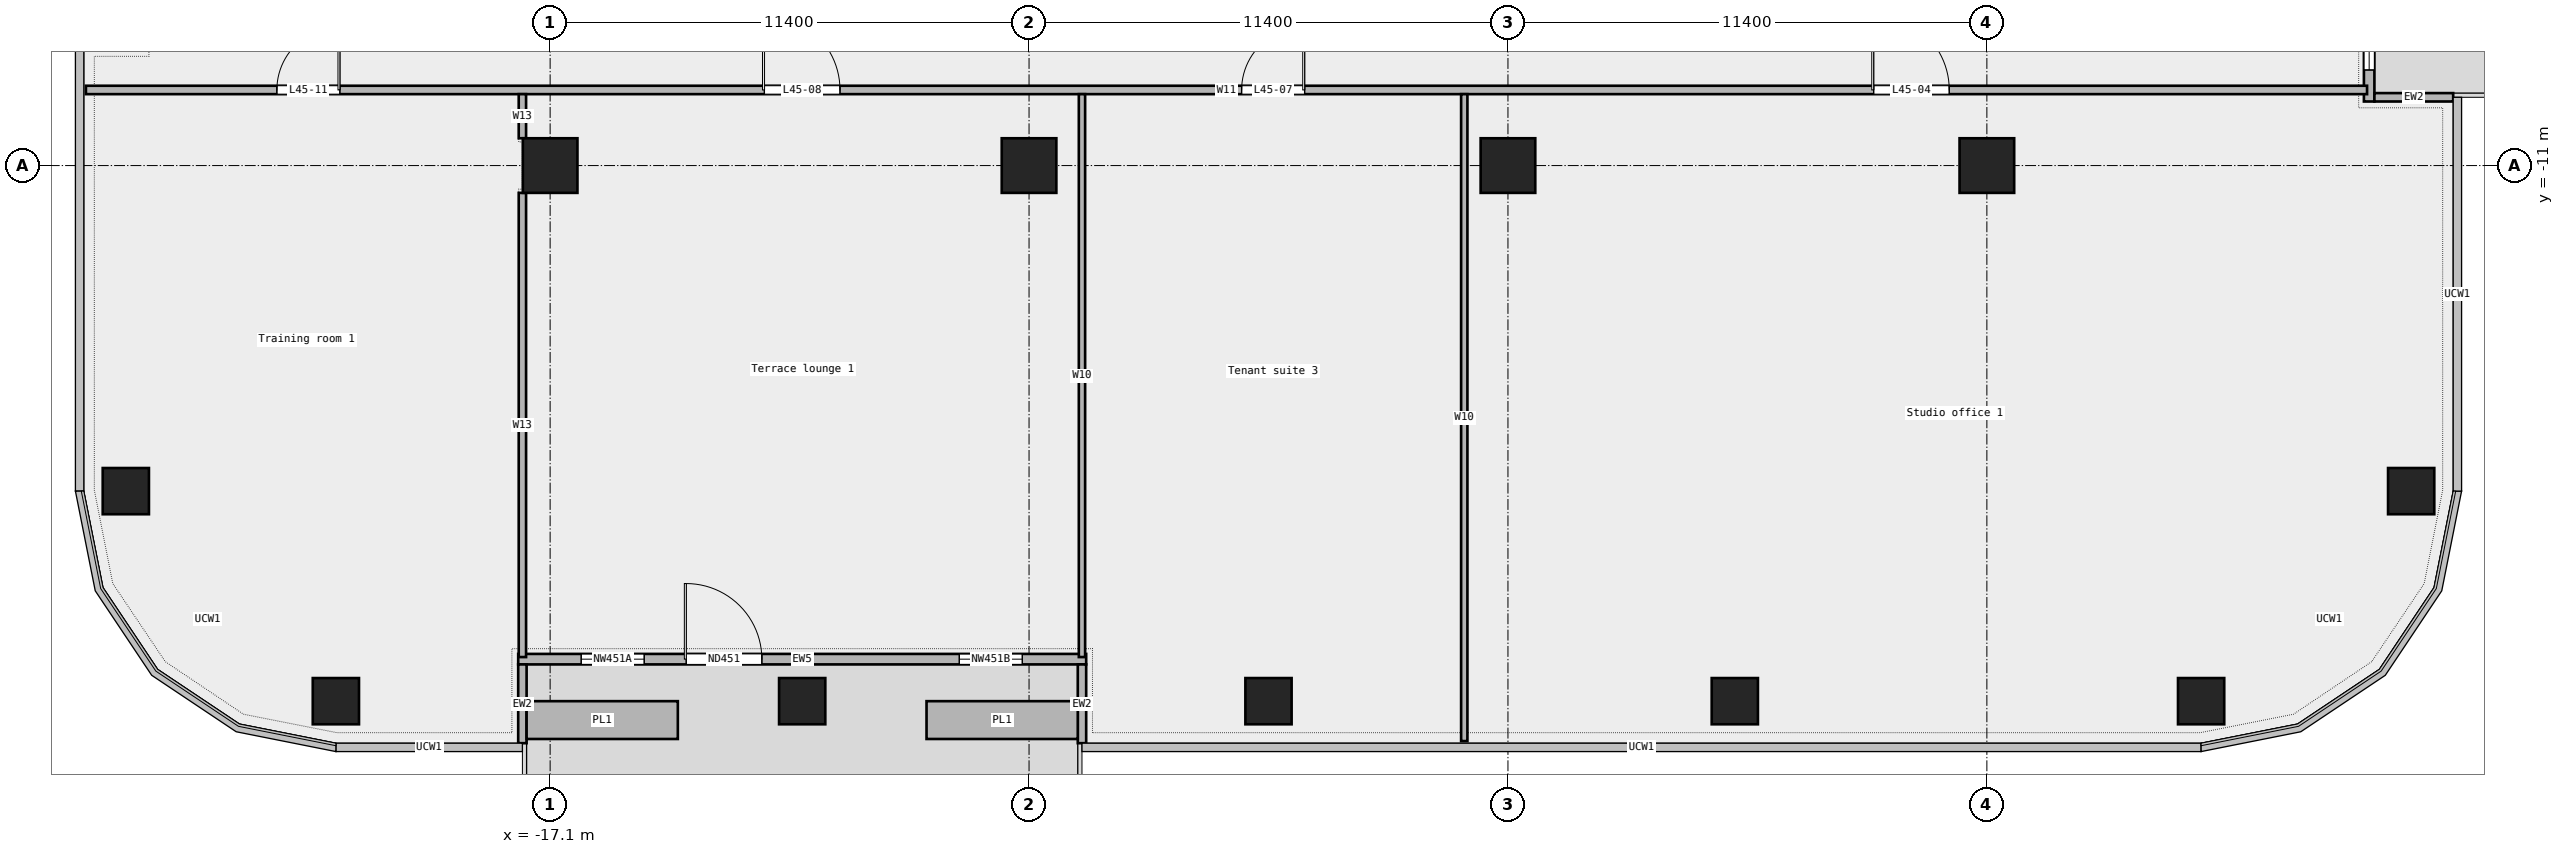
"""IFC4 building model, lengths in metres.
Left out: names, types, materials, properties, quantities, classifications, styles, units other than length and angle.
Written with IfcOpenShell. Run it as: python <this file> out.ifc"""

import sys

from ifc_helpers import new_model, si_unit, direction, frame, frame_2d, origin, origin_2d, place, context, subcontext, project, spatial, rectangle, extrude, element, fill, save


model = new_model("IFC4")
c1 = context("Model", 3, precision=1e-05, world=origin(), true_north=direction((0.0, 1.0)))
c2 = subcontext(c1, "Body", "Model", "MODEL_VIEW")
j1 = project(units=[si_unit("LENGTHUNIT", "METRE"), si_unit("PLANEANGLEUNIT", "RADIAN")], contexts=[c1])
p1 = place(None, origin())
s1 = spatial("IfcSite", under=j1, at=p1, CompositionType="ELEMENT")
p2 = place(p1, origin())
s2 = spatial("IfcBuilding", under=s1, at=p2, CompositionType="ELEMENT")
p3 = place(p2, frame((0.0, 0.0, 215.0)))
s3 = spatial("IfcBuildingStorey", under=s2, at=p3, CompositionType="ELEMENT", Elevation=215.0)
for number, where, z_axis, x_axis in (
    (1, (-22.2, -23.75, 0.0), (0.0, 0.0, 1.0), (1.0, 0.0, 0.0)),
    (2, (-11.1, -23.75, 0.0), (0.0, 0.0, 1.0), (1.0, 0.0, 0.0)),
    (3, (0.0, -23.75, 0.0), (0.0, 0.0, 1.0), (1.0, 0.0, 0.0)),
    (4, (11.1, -23.75, 0.0), (0.0, 0.0, 1.0), (1.0, 0.0, 0.0)),
    (5, (22.2, -23.75, 0.0), (0.0, 0.0, 1.0), (1.0, 0.0, 0.0)),
    (6, (27.2, -18.75, 0.0), (0.0, 0.0, 1.0), (1.0, 0.0, 0.0)),
    (7, (-27.2, -18.75, 0.0), (0.0, 0.0, 1.0), (1.0, 0.0, 0.0)),
):
    element("IfcColumn", number, at=place(p3, frame(where, z_axis=z_axis, x_axis=x_axis)), inside=s3, PredefinedType="COLUMN", context=c2, shape_type="SweptSolid", body=[
        extrude(rectangle(XDim=1.1, YDim=1.1, at=origin_2d()), origin(), (0.0, 0.0, 1.0), 3.6),
    ])
for number, where, z_axis, x_axis in (
    (8, (-17.1, -11.0, 0.0), (0.0, 0.0, 1.0), (1.0, 0.0, 0.0)),
    (9, (-5.7, -11.0, 0.0), (0.0, 0.0, 1.0), (1.0, 0.0, 0.0)),
    (10, (5.7, -11.0, 0.0), (0.0, 0.0, 1.0), (1.0, 0.0, 0.0)),
    (11, (17.1, -11.0, 0.0), (0.0, 0.0, 1.0), (1.0, 0.0, 0.0)),
):
    element("IfcColumn", number, at=place(p3, frame(where, z_axis=z_axis, x_axis=x_axis)), inside=s3, PredefinedType="COLUMN", context=c2, shape_type="SweptSolid", body=[
        extrude(rectangle(XDim=1.3, YDim=1.3, at=origin_2d()), origin(), (0.0, 0.0, 1.0), 3.6),
    ])
p4 = place(p3, frame((-17.86, -22.75, 0.0), z_axis=(0.0, 0.0, 1.0), x_axis=(1.0, 0.0, 0.0)))
e12 = element("IfcWall", 12, at=p4, inside=s3, PredefinedType="STANDARD", context=c2, shape_type="SweptSolid", body=[
    extrude(rectangle(XDim=13.52, YDim=0.25, at=frame_2d((6.76, 0.0))), origin(), (0.0, 0.0, 1.0), 3.6),
])
p5 = place(p4, frame((1.5, 0.0, 0.45)))
e13 = element("IfcOpeningElement", 13, at=p5, cuts=e12, PredefinedType="OPENING", context=c2, shape_type="SweptSolid", body=[
    extrude(rectangle(XDim=1.5, YDim=2.4, at=frame_2d((0.75, 1.2))), frame((0.0, 0.137, 0.0), z_axis=(0.0, -1.0, 0.0), x_axis=(1.0, 0.0, 0.0)), (0.0, 0.0, 1.0), 0.274),
])
p6 = place(p4, frame((4.0, 0.0, 0.0)))
e14 = element("IfcOpeningElement", 14, at=p6, cuts=e12, PredefinedType="OPENING", context=c2, shape_type="SweptSolid", body=[
    extrude(rectangle(XDim=1.8, YDim=2.4, at=frame_2d((0.9, 1.2))), frame((0.0, 0.137, 0.0), z_axis=(0.0, -1.0, 0.0), x_axis=(1.0, 0.0, 0.0)), (0.0, 0.0, 1.0), 0.274),
])
p7 = place(p4, frame((10.5, 0.0, 0.45)))
e15 = element("IfcOpeningElement", 15, at=p7, cuts=e12, PredefinedType="OPENING", context=c2, shape_type="SweptSolid", body=[
    extrude(rectangle(XDim=1.5, YDim=2.4, at=frame_2d((0.75, 1.2))), frame((0.0, 0.137, 0.0), z_axis=(0.0, -1.0, 0.0), x_axis=(1.0, 0.0, 0.0)), (0.0, 0.0, 1.0), 0.274),
])
for number, where, z_axis, x_axis in (
    (16, (-17.76, -24.75, 0.0), (0.0, 0.0, 1.0), (0.0, 1.0, 0.0)),
    (17, (-4.44, -24.75, 0.0), (0.0, 0.0, 1.0), (0.0, 1.0, 0.0)),
):
    element("IfcWall", number, at=place(p3, frame(where, z_axis=z_axis, x_axis=x_axis)), inside=s3, PredefinedType="STANDARD", context=c2, shape_type="SweptSolid", body=[
        extrude(rectangle(XDim=1.875, YDim=0.2, at=frame_2d((0.938, 0.0))), origin(), (0.0, 0.0, 1.0), 3.6),
    ])
for number, where, z_axis, x_axis in (
    (18, (-17.66, -24.2, 0.0), (0.0, 0.0, 1.0), (1.0, 0.0, 0.0)),
    (19, (-8.14, -24.2, 0.0), (0.0, 0.0, 1.0), (1.0, 0.0, 0.0)),
):
    element("IfcWall", number, at=place(p3, frame(where, z_axis=z_axis, x_axis=x_axis)), inside=s3, PredefinedType="STANDARD", context=c2, shape_type="SweptSolid", body=[
        extrude(rectangle(XDim=3.6, YDim=0.9, at=frame_2d((1.8, 0.0))), origin(), (0.0, 0.0, 1.0), 0.7),
    ])
p8 = place(p3, frame((26.2, -9.475, 0.0), z_axis=(0.0, 0.0, 1.0), x_axis=(0.0, 1.0, 0.0)))
e20 = element("IfcWall", 20, at=p8, inside=s3, PredefinedType="STANDARD", context=c2, shape_type="SweptSolid", body=[
    extrude(rectangle(XDim=14.263, YDim=0.25, at=frame_2d((7.131, 0.0))), origin(), (0.0, 0.0, 1.0), 3.6),
])
p9 = place(p8, frame((0.75, 0.0, 0.45)))
e21 = element("IfcOpeningElement", 21, at=p9, cuts=e20, PredefinedType="OPENING", context=c2, shape_type="SweptSolid", body=[
    extrude(rectangle(XDim=1.5, YDim=2.4, at=frame_2d((0.75, 1.2))), frame((0.0, 0.137, 0.0), z_axis=(0.0, -1.0, 0.0), x_axis=(1.0, 0.0, 0.0)), (0.0, 0.0, 1.0), 0.274),
])
p10 = place(p8, frame((6.25, 0.0, 0.0)))
e22 = element("IfcOpeningElement", 22, at=p10, cuts=e20, PredefinedType="OPENING", context=c2, shape_type="SweptSolid", body=[
    extrude(rectangle(XDim=1.8, YDim=2.4, at=frame_2d((0.9, 1.2))), frame((0.0, 0.137, 0.0), z_axis=(0.0, -1.0, 0.0), x_axis=(1.0, 0.0, 0.0)), (0.0, 0.0, 1.0), 0.274),
])
p11 = place(p8, frame((11.0, 0.0, 0.45)))
e23 = element("IfcOpeningElement", 23, at=p11, cuts=e20, PredefinedType="OPENING", context=c2, shape_type="SweptSolid", body=[
    extrude(rectangle(XDim=1.5, YDim=2.4, at=frame_2d((0.75, 1.2))), frame((0.0, 0.137, 0.0), z_axis=(0.0, -1.0, 0.0), x_axis=(1.0, 0.0, 0.0)), (0.0, 0.0, 1.0), 0.274),
])
p12 = place(p3, frame((28.2, -9.375, 0.0), z_axis=(0.0, 0.0, 1.0), x_axis=(-1.0, 0.0, 0.0)))
e24 = element("IfcWall", 24, at=p12, inside=s3, PredefinedType="STANDARD", context=c2, shape_type="SweptSolid", body=[
    extrude(rectangle(XDim=1.875, YDim=0.2, at=frame_2d((0.938, 0.0))), origin(), (0.0, 0.0, 1.0), 3.6),
])
p13 = place(p3, frame((-28.15, -9.2, 0.0), z_axis=(0.0, 0.0, 1.0), x_axis=(1.0, 0.0, 0.0)))
e25 = element("IfcWall", 25, at=p13, inside=s3, PredefinedType="PARTITIONING", context=c2, shape_type="SweptSolid", body=[
    extrude(rectangle(XDim=54.3, YDim=0.2, at=frame_2d((27.15, 0.0))), origin(), (0.0, 0.0, 1.0), 3.6),
])
p14 = place(p13, frame((42.555, 0.0, 0.0)))
e26 = element("IfcOpeningElement", 26, at=p14, cuts=e25, PredefinedType="OPENING", context=c2, shape_type="SweptSolid", body=[
    extrude(rectangle(XDim=1.8, YDim=2.1, at=frame_2d((0.9, 1.05))), frame((0.0, 0.112, 0.0), z_axis=(0.0, -1.0, 0.0), x_axis=(1.0, 0.0, 0.0)), (0.0, 0.0, 1.0), 0.224),
])
p15 = place(p13, frame((27.51, 0.0, 0.0)))
e27 = element("IfcOpeningElement", 27, at=p15, cuts=e25, PredefinedType="OPENING", context=c2, shape_type="SweptSolid", body=[
    extrude(rectangle(XDim=1.5, YDim=2.1, at=frame_2d((0.75, 1.05))), frame((0.0, 0.112, 0.0), z_axis=(0.0, -1.0, 0.0), x_axis=(1.0, 0.0, 0.0)), (0.0, 0.0, 1.0), 0.224),
])
p16 = place(p13, frame((16.15, 0.0, 0.0)))
e28 = element("IfcOpeningElement", 28, at=p16, cuts=e25, PredefinedType="OPENING", context=c2, shape_type="SweptSolid", body=[
    extrude(rectangle(XDim=1.8, YDim=2.1, at=frame_2d((0.9, 1.05))), frame((0.0, 0.112, 0.0), z_axis=(0.0, -1.0, 0.0), x_axis=(1.0, 0.0, 0.0)), (0.0, 0.0, 1.0), 0.224),
])
p17 = place(p13, frame((4.545, 0.0, 0.0)))
e29 = element("IfcOpeningElement", 29, at=p17, cuts=e25, PredefinedType="OPENING", context=c2, shape_type="SweptSolid", body=[
    extrude(rectangle(XDim=1.5, YDim=2.1, at=frame_2d((0.75, 1.05))), frame((0.0, 0.112, 0.0), z_axis=(0.0, -1.0, 0.0), x_axis=(1.0, 0.0, 0.0)), (0.0, 0.0, 1.0), 0.224),
])
p18 = place(p3, frame((-17.76, -22.7, 0.0), z_axis=(0.0, 0.0, 1.0), x_axis=(0.0, 1.0, 0.0)))
e30 = element("IfcWall", 30, at=p18, inside=s3, PredefinedType="PARTITIONING", context=c2, shape_type="SweptSolid", body=[
    extrude(rectangle(XDim=11.05, YDim=0.175, at=frame_2d((5.525, 0.0))), origin(), (0.0, 0.0, 1.0), 3.6),
])
p19 = place(p3, frame((-17.76, -10.35, 0.0), z_axis=(0.0, 0.0, 1.0), x_axis=(0.0, 1.0, 0.0)))
e31 = element("IfcWall", 31, at=p19, inside=s3, PredefinedType="PARTITIONING", context=c2, shape_type="SweptSolid", body=[
    extrude(rectangle(XDim=1.05, YDim=0.175, at=frame_2d((0.525, 0.0))), origin(), (0.0, 0.0, 1.0), 3.6),
])
p20 = place(p3, frame((-4.44, -22.7, 0.0), z_axis=(0.0, 0.0, 1.0), x_axis=(0.0, 1.0, 0.0)))
e32 = element("IfcWall", 32, at=p20, inside=s3, PredefinedType="PARTITIONING", context=c2, shape_type="SweptSolid", body=[
    extrude(rectangle(XDim=13.4, YDim=0.15, at=frame_2d((6.7, 0.0))), origin(), (0.0, 0.0, 1.0), 3.6),
])
p21 = place(p3, frame((4.66, -24.7, 0.0), z_axis=(0.0, 0.0, 1.0), x_axis=(0.0, 1.0, 0.0)))
e33 = element("IfcWall", 33, at=p21, inside=s3, PredefinedType="PARTITIONING", context=c2, shape_type="SweptSolid", body=[
    extrude(rectangle(XDim=15.4, YDim=0.15, at=frame_2d((7.7, 0.0))), origin(), (0.0, 0.0, 1.0), 3.6),
])
p22 = place(p5, origin())
e34 = element("IfcWindow", 34, at=p22, inside=s3, PartitioningType="SINGLE_PANEL", PredefinedType="WINDOW", context=c2, shape_type="SweptSolid", body=[
    extrude(rectangle(XDim=1.5, YDim=2.4, at=frame_2d((0.75, 1.2))), frame((0.0, 0.03, 0.0), z_axis=(0.0, -1.0, 0.0), x_axis=(1.0, 0.0, 0.0)), (0.0, 0.0, 1.0), 0.06),
])
fill(e13, e34)
p23 = place(p6, origin())
e35 = element("IfcDoor", 35, at=p23, inside=s3, OperationType="DOUBLE_DOOR_SINGLE_SWING", PredefinedType="DOOR", context=c2, shape_type="SweptSolid", body=[
    extrude(rectangle(XDim=1.8, YDim=2.4, at=frame_2d((0.9, 1.2))), frame((0.0, 0.025, 0.0), z_axis=(0.0, -1.0, 0.0), x_axis=(1.0, 0.0, 0.0)), (0.0, 0.0, 1.0), 0.05),
])
fill(e14, e35)
p24 = place(p7, origin())
e36 = element("IfcWindow", 36, at=p24, inside=s3, PartitioningType="SINGLE_PANEL", PredefinedType="WINDOW", context=c2, shape_type="SweptSolid", body=[
    extrude(rectangle(XDim=1.5, YDim=2.4, at=frame_2d((0.75, 1.2))), frame((0.0, 0.03, 0.0), z_axis=(0.0, -1.0, 0.0), x_axis=(1.0, 0.0, 0.0)), (0.0, 0.0, 1.0), 0.06),
])
fill(e15, e36)
p25 = place(p9, origin())
e37 = element("IfcWindow", 37, at=p25, inside=s3, PartitioningType="SINGLE_PANEL", PredefinedType="WINDOW", context=c2, shape_type="SweptSolid", body=[
    extrude(rectangle(XDim=1.5, YDim=2.4, at=frame_2d((0.75, 1.2))), frame((0.0, 0.03, 0.0), z_axis=(0.0, -1.0, 0.0), x_axis=(1.0, 0.0, 0.0)), (0.0, 0.0, 1.0), 0.06),
])
fill(e21, e37)
p26 = place(p14, origin())
e38 = element("IfcDoor", 38, at=p26, inside=s3, OperationType="DOUBLE_DOOR_SINGLE_SWING", PredefinedType="DOOR", context=c2, shape_type="SweptSolid", body=[
    extrude(rectangle(XDim=1.8, YDim=2.1, at=frame_2d((0.9, 1.05))), frame((0.0, 0.025, 0.0), z_axis=(0.0, -1.0, 0.0), x_axis=(1.0, 0.0, 0.0)), (0.0, 0.0, 1.0), 0.05),
])
fill(e26, e38)
p27 = place(p15, origin())
e39 = element("IfcDoor", 39, at=p27, inside=s3, OperationType="DOUBLE_DOOR_SINGLE_SWING", PredefinedType="DOOR", context=c2, shape_type="SweptSolid", body=[
    extrude(rectangle(XDim=1.5, YDim=2.1, at=frame_2d((0.75, 1.05))), frame((0.0, 0.025, 0.0), z_axis=(0.0, -1.0, 0.0), x_axis=(1.0, 0.0, 0.0)), (0.0, 0.0, 1.0), 0.05),
])
fill(e27, e39)
p28 = place(p16, origin())
e40 = element("IfcDoor", 40, at=p28, inside=s3, OperationType="DOUBLE_DOOR_SINGLE_SWING", PredefinedType="DOOR", context=c2, shape_type="SweptSolid", body=[
    extrude(rectangle(XDim=1.8, YDim=2.1, at=frame_2d((0.9, 1.05))), frame((0.0, 0.025, 0.0), z_axis=(0.0, -1.0, 0.0), x_axis=(1.0, 0.0, 0.0)), (0.0, 0.0, 1.0), 0.05),
])
fill(e28, e40)
p29 = place(p17, origin())
e41 = element("IfcDoor", 41, at=p29, inside=s3, OperationType="DOUBLE_DOOR_SINGLE_SWING", PredefinedType="DOOR", context=c2, shape_type="SweptSolid", body=[
    extrude(rectangle(XDim=1.5, YDim=2.1, at=frame_2d((0.75, 1.05))), frame((0.0, 0.025, 0.0), z_axis=(0.0, -1.0, 0.0), x_axis=(1.0, 0.0, 0.0)), (0.0, 0.0, 1.0), 0.05),
])
fill(e29, e41)
save(model, sys.argv[1])
